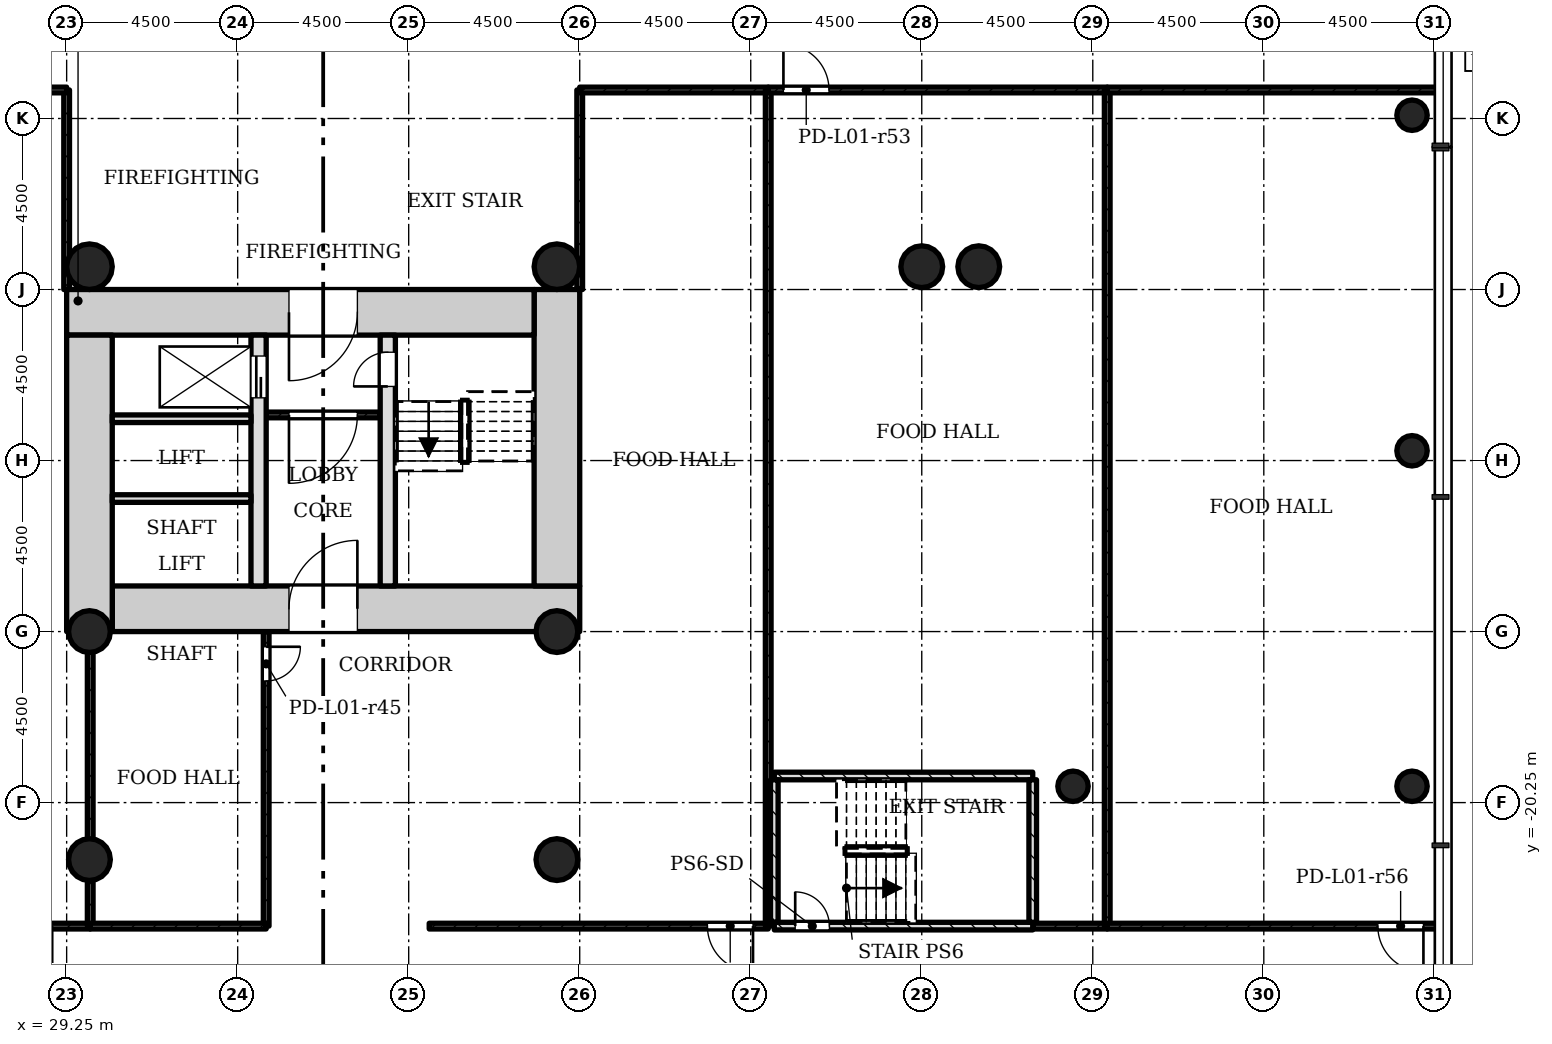
"""IFC4 building model, lengths in metres.
Left out: names, types, materials, properties, quantities, classifications, styles, units other than length and angle.
Written with IfcOpenShell. Run it as: python <this file> out.ifc"""

import sys

from ifc_helpers import new_model, si_unit, direction, frame, frame_2d, origin, origin_2d, place, context, subcontext, project, spatial, rectangle, hollow_circle, extrude, element, fill, save


model = new_model("IFC4")
c1 = context("Model", 3, precision=1e-05, world=origin(), true_north=direction((0.0, 1.0)))
c2 = subcontext(c1, "Body", "Model", "MODEL_VIEW")
j1 = project(units=[si_unit("LENGTHUNIT", "METRE"), si_unit("PLANEANGLEUNIT", "RADIAN")], contexts=[c1])
p1 = place(None, origin())
s1 = spatial("IfcSite", under=j1, at=p1, CompositionType="ELEMENT")
p2 = place(p1, origin())
s2 = spatial("IfcBuilding", under=s1, at=p2, CompositionType="ELEMENT")
p3 = place(p2, frame((0.0, 0.0, 6.0)))
s3 = spatial("IfcBuildingStorey", under=s2, at=p3, CompositionType="ELEMENT", Elevation=6.0)
p4 = place(p3, frame((30.45, -15.15, 0.0), z_axis=(0.0, 0.0, 1.0), x_axis=(1.0, 0.0, 0.0)))
e1 = element("IfcWall", 1, at=p4, inside=s3, PredefinedType="SHEAR", context=c2, shape_type="SweptSolid", body=[
    extrude(rectangle(XDim=12.3, YDim=1.2, at=frame_2d((6.15, 0.0))), origin(), (0.0, 0.0, 1.0), 5.0),
])
p5 = place(p4, frame((4.65, 0.0, 0.0)))
e2 = element("IfcOpeningElement", 2, at=p5, cuts=e1, PredefinedType="OPENING", context=c2, shape_type="SweptSolid", body=[
    extrude(rectangle(XDim=1.8, YDim=2.1, at=frame_2d((0.9, 1.05))), frame((0.0, 0.61, 0.0), z_axis=(0.0, -1.0, 0.0), x_axis=(1.0, 0.0, 0.0)), (0.0, 0.0, 1.0), 1.22),
])
p6 = place(p3, frame((42.15, -14.55, 0.0), z_axis=(0.0, 0.0, 1.0), x_axis=(0.0, 1.0, 0.0)))
e3 = element("IfcWall", 3, at=p6, inside=s3, PredefinedType="SHEAR", context=c2, shape_type="SweptSolid", body=[
    extrude(rectangle(XDim=7.8, YDim=1.2, at=frame_2d((3.9, 0.0))), origin(), (0.0, 0.0, 1.0), 5.0),
])
p7 = place(p3, frame((41.55, -7.35, 0.0), z_axis=(0.0, 0.0, 1.0), x_axis=(-1.0, 0.0, 0.0)))
e4 = element("IfcWall", 4, at=p7, inside=s3, PredefinedType="SHEAR", context=c2, shape_type="SweptSolid", body=[
    extrude(rectangle(XDim=12.3, YDim=1.2, at=frame_2d((6.15, 0.0))), origin(), (0.0, 0.0, 1.0), 5.0),
])
p8 = place(p7, frame((4.65, 0.0, 0.0)))
e5 = element("IfcOpeningElement", 5, at=p8, cuts=e4, PredefinedType="OPENING", context=c2, shape_type="SweptSolid", body=[
    extrude(rectangle(XDim=1.8, YDim=2.1, at=frame_2d((0.9, 1.05))), frame((0.0, 0.61, 0.0), z_axis=(0.0, -1.0, 0.0), x_axis=(1.0, 0.0, 0.0)), (0.0, 0.0, 1.0), 1.22),
])
p9 = place(p3, frame((29.85, -7.95, 0.0), z_axis=(0.0, 0.0, 1.0), x_axis=(0.0, -1.0, 0.0)))
e6 = element("IfcWall", 6, at=p9, inside=s3, PredefinedType="SHEAR", context=c2, shape_type="SweptSolid", body=[
    extrude(rectangle(XDim=7.8, YDim=1.2, at=frame_2d((3.9, 0.0))), origin(), (0.0, 0.0, 1.0), 5.0),
])
p10 = place(p3, frame((34.3, -14.55, 0.0), z_axis=(0.0, 0.0, 1.0), x_axis=(0.0, 1.0, 0.0)))
e7 = element("IfcWall", 7, at=p10, inside=s3, PredefinedType="SHEAR", context=c2, shape_type="SweptSolid", body=[
    extrude(rectangle(XDim=6.6, YDim=0.4, at=frame_2d((3.3, 0.0))), origin(), (0.0, 0.0, 1.0), 5.0),
])
p11 = place(p10, frame((4.95, 0.0, 0.0)))
e8 = element("IfcOpeningElement", 8, at=p11, cuts=e7, PredefinedType="OPENING", context=c2, shape_type="SweptSolid", body=[
    extrude(rectangle(XDim=1.1, YDim=2.1, at=frame_2d((0.55, 1.05))), frame((0.0, 0.21, 0.0), z_axis=(0.0, -1.0, 0.0), x_axis=(1.0, 0.0, 0.0)), (0.0, 0.0, 1.0), 0.42),
])
p12 = place(p3, frame((37.7, -14.55, 0.0), z_axis=(0.0, 0.0, 1.0), x_axis=(0.0, 1.0, 0.0)))
e9 = element("IfcWall", 9, at=p12, inside=s3, PredefinedType="SHEAR", context=c2, shape_type="SweptSolid", body=[
    extrude(rectangle(XDim=6.6, YDim=0.4, at=frame_2d((3.3, 0.0))), origin(), (0.0, 0.0, 1.0), 5.0),
])
p13 = place(p12, frame((5.25, 0.0, 0.0)))
e10 = element("IfcOpeningElement", 10, at=p13, cuts=e9, PredefinedType="OPENING", context=c2, shape_type="SweptSolid", body=[
    extrude(rectangle(XDim=0.9, YDim=2.1, at=frame_2d((0.45, 1.05))), frame((0.0, 0.21, 0.0), z_axis=(0.0, -1.0, 0.0), x_axis=(1.0, 0.0, 0.0)), (0.0, 0.0, 1.0), 0.42),
])
for number, where, z_axis, x_axis in (
    (11, (42.15, -15.75, 0.0), (0.0, 0.0, 1.0), (1.0, 0.0, 0.0)),
    (12, (29.85, -15.75, 0.0), (0.0, 0.0, 1.0), (1.0, 0.0, 0.0)),
    (13, (42.15, -21.75, 0.0), (0.0, 0.0, 1.0), (1.0, 0.0, 0.0)),
    (14, (29.85, -21.75, 0.0), (0.0, 0.0, 1.0), (1.0, 0.0, 0.0)),
    (15, (51.75, -6.15, 0.0), (0.0, 0.0, 1.0), (1.0, 0.0, 0.0)),
    (16, (53.25, -6.15, 0.0), (0.0, 0.0, 1.0), (1.0, 0.0, 0.0)),
):
    element("IfcColumn", number, at=place(p3, frame(where, z_axis=z_axis, x_axis=x_axis)), inside=s3, PredefinedType="COLUMN", context=c2, shape_type="SweptSolid", body=[
        extrude(hollow_circle(Radius=0.55, WallThickness=0.04, at=origin_2d()), origin(), (0.0, 0.0, 1.0), 5.0),
    ])
for number, where, z_axis, x_axis in (
    (17, (42.15, -6.15, 0.0), (0.0, 0.0, 1.0), (1.0, 0.0, 0.0)),
    (18, (29.85, -6.15, 0.0), (0.0, 0.0, 1.0), (1.0, 0.0, 0.0)),
):
    element("IfcColumn", number, at=place(p3, frame(where, z_axis=z_axis, x_axis=x_axis)), inside=s3, PredefinedType="COLUMN", context=c2, shape_type="SweptSolid", body=[
        extrude(hollow_circle(Radius=0.6, WallThickness=0.045, at=origin_2d()), origin(), (0.0, 0.0, 1.0), 5.0),
    ])
for number, where, z_axis, x_axis in (
    (19, (55.73, -19.821, 0.0), (0.0, 0.0, 1.0), (1.0, 0.0, 0.0)),
    (20, (64.65, -19.821, 0.0), (0.0, 0.0, 1.0), (1.0, 0.0, 0.0)),
    (21, (64.65, -10.993, 0.0), (0.0, 0.0, 1.0), (1.0, 0.0, 0.0)),
    (22, (64.65, -2.164, 0.0), (0.0, 0.0, 1.0), (1.0, 0.0, 0.0)),
):
    element("IfcColumn", number, at=place(p3, frame(where, z_axis=z_axis, x_axis=x_axis)), inside=s3, PredefinedType="COLUMN", context=c2, shape_type="SweptSolid", body=[
        extrude(hollow_circle(Radius=0.4, WallThickness=0.028, at=origin_2d()), origin(), (0.0, 0.0, 1.0), 5.0),
    ])
p14 = place(p3, frame((34.5, -10.05, 0.0), z_axis=(0.0, 0.0, 1.0), x_axis=(1.0, 0.0, 0.0)))
e23 = element("IfcWall", 23, at=p14, inside=s3, PredefinedType="PARTITIONING", context=c2, shape_type="SweptSolid", body=[
    extrude(rectangle(XDim=3.0, YDim=0.15, at=frame_2d((1.5, 0.0))), origin(), (0.0, 0.0, 1.0), 4.58),
])
p15 = place(p14, frame((0.6, 0.0, 0.0)))
e24 = element("IfcOpeningElement", 24, at=p15, cuts=e23, PredefinedType="OPENING", context=c2, shape_type="SweptSolid", body=[
    extrude(rectangle(XDim=1.8, YDim=2.1, at=frame_2d((0.9, 1.05))), frame((0.0, 0.085, 0.0), z_axis=(0.0, -1.0, 0.0), x_axis=(1.0, 0.0, 0.0)), (0.0, 0.0, 1.0), 0.17),
])
for number, where, z_axis, x_axis in (
    (25, (30.45, -10.15, 0.0), (0.0, 0.0, 1.0), (1.0, 0.0, 0.0)),
    (26, (30.45, -12.25, 0.0), (0.0, 0.0, 1.0), (1.0, 0.0, 0.0)),
):
    element("IfcWall", number, at=place(p3, frame(where, z_axis=z_axis, x_axis=x_axis)), inside=s3, PredefinedType="SOLIDWALL", context=c2, shape_type="SweptSolid", body=[
        extrude(rectangle(XDim=3.65, YDim=0.2, at=frame_2d((1.825, 0.0))), origin(), (0.0, 0.0, 1.0), 4.58),
    ])
p16 = place(p3, frame((29.25, -1.5, 0.0), z_axis=(0.0, 0.0, 1.0), x_axis=(0.0, -1.0, 0.0)))
e27 = element("IfcWall", 27, at=p16, inside=s3, PredefinedType="PARTITIONING", context=c2, shape_type="SweptSolid", body=[
    extrude(rectangle(XDim=5.25, YDim=0.15, at=frame_2d((2.625, 0.0))), origin(), (0.0, 0.0, 1.0), 4.58),
])
p17 = place(p3, frame((29.87, -23.5, 0.0), z_axis=(0.0, 0.0, 1.0), x_axis=(-1.0, 0.0, 0.0)))
e28 = element("IfcWall", 28, at=p17, inside=s3, PredefinedType="PARTITIONING", context=c2, shape_type="SweptSolid", body=[
    extrude(rectangle(XDim=8.92, YDim=0.15, at=frame_2d((4.46, 0.0))), origin(), (0.0, 0.0, 1.0), 4.58),
])
p18 = place(p17, frame((1.0, 0.0, 0.0)))
e29 = element("IfcOpeningElement", 29, at=p18, cuts=e28, PredefinedType="OPENING", context=c2, shape_type="SweptSolid", body=[
    extrude(rectangle(XDim=1.2, YDim=2.1, at=frame_2d((0.6, 1.05))), frame((0.0, 0.085, 0.0), z_axis=(0.0, -1.0, 0.0), x_axis=(1.0, 0.0, 0.0)), (0.0, 0.0, 1.0), 0.17),
])
p19 = place(p3, frame((20.95, -1.5, 0.0), z_axis=(0.0, 0.0, 1.0), x_axis=(1.0, 0.0, 0.0)))
e30 = element("IfcWall", 30, at=p19, inside=s3, PredefinedType="PARTITIONING", context=c2, shape_type="SweptSolid", body=[
    extrude(rectangle(XDim=8.3, YDim=0.15, at=frame_2d((4.15, 0.0))), origin(), (0.0, 0.0, 1.0), 4.58),
])
p20 = place(p3, frame((29.87, -15.75, 0.0), z_axis=(0.0, 0.0, 1.0), x_axis=(0.0, -1.0, 0.0)))
e31 = element("IfcWall", 31, at=p20, inside=s3, PredefinedType="PARTITIONING", context=c2, shape_type="SweptSolid", body=[
    extrude(rectangle(XDim=7.75, YDim=0.15, at=frame_2d((3.875, 0.0))), origin(), (0.0, 0.0, 1.0), 4.58),
])
p21 = place(p3, frame((34.5, -15.75, 0.0), z_axis=(0.0, 0.0, 1.0), x_axis=(0.0, -1.0, 0.0)))
e32 = element("IfcWall", 32, at=p21, inside=s3, PredefinedType="PARTITIONING", context=c2, shape_type="SweptSolid", body=[
    extrude(rectangle(XDim=7.75, YDim=0.15, at=frame_2d((3.875, 0.0))), origin(), (0.0, 0.0, 1.0), 4.58),
])
p22 = place(p21, frame((0.4, 0.0, 0.0)))
e33 = element("IfcOpeningElement", 33, at=p22, cuts=e32, PredefinedType="OPENING", context=c2, shape_type="SweptSolid", body=[
    extrude(rectangle(XDim=0.9, YDim=2.1, at=frame_2d((0.45, 1.05))), frame((0.0, 0.085, 0.0), z_axis=(0.0, -1.0, 0.0), x_axis=(1.0, 0.0, 0.0)), (0.0, 0.0, 1.0), 0.17),
])
p23 = place(p3, frame((34.5, -23.5, 0.0), z_axis=(0.0, 0.0, 1.0), x_axis=(-1.0, 0.0, 0.0)))
e34 = element("IfcWall", 34, at=p23, inside=s3, PredefinedType="PARTITIONING", context=c2, shape_type="SweptSolid", body=[
    extrude(rectangle(XDim=4.63, YDim=0.15, at=frame_2d((2.315, 0.0))), origin(), (0.0, 0.0, 1.0), 4.58),
])
p24 = place(p3, frame((42.75, -6.75, 0.0), z_axis=(0.0, 0.0, 1.0), x_axis=(0.0, 1.0, 0.0)))
e35 = element("IfcWall", 35, at=p24, inside=s3, PredefinedType="PARTITIONING", context=c2, shape_type="SweptSolid", body=[
    extrude(rectangle(XDim=5.25, YDim=0.15, at=frame_2d((2.625, 0.0))), origin(), (0.0, 0.0, 1.0), 4.58),
])
p25 = place(p3, frame((42.75, -1.5, 0.0), z_axis=(0.0, 0.0, 1.0), x_axis=(1.0, 0.0, 0.0)))
e36 = element("IfcWall", 36, at=p25, inside=s3, PredefinedType="PARTITIONING", context=c2, shape_type="SweptSolid", body=[
    extrude(rectangle(XDim=4.96, YDim=0.15, at=frame_2d((2.48, 0.0))), origin(), (0.0, 0.0, 1.0), 4.58),
])
p26 = place(p3, frame((47.71, -23.5, 0.0), z_axis=(0.0, 0.0, 1.0), x_axis=(-1.0, 0.0, 0.0)))
e37 = element("IfcWall", 37, at=p26, inside=s3, PredefinedType="PARTITIONING", context=c2, shape_type="SweptSolid", body=[
    extrude(rectangle(XDim=8.92, YDim=0.15, at=frame_2d((4.46, 0.0))), origin(), (0.0, 0.0, 1.0), 4.58),
])
p27 = place(p26, frame((0.4, 0.0, 0.0)))
e38 = element("IfcOpeningElement", 38, at=p27, cuts=e37, PredefinedType="OPENING", context=c2, shape_type="SweptSolid", body=[
    extrude(rectangle(XDim=1.2, YDim=2.1, at=frame_2d((0.6, 1.05))), frame((0.0, 0.085, 0.0), z_axis=(0.0, -1.0, 0.0), x_axis=(1.0, 0.0, 0.0)), (0.0, 0.0, 1.0), 0.17),
])
p28 = place(p3, frame((47.71, -1.5, 0.0), z_axis=(0.0, 0.0, 1.0), x_axis=(0.0, -1.0, 0.0)))
e39 = element("IfcWall", 39, at=p28, inside=s3, PredefinedType="PARTITIONING", context=c2, shape_type="SweptSolid", body=[
    extrude(rectangle(XDim=22.0, YDim=0.15, at=frame_2d((11.0, 0.0))), origin(), (0.0, 0.0, 1.0), 4.58),
])
p29 = place(p3, frame((56.63, -23.5, 0.0), z_axis=(0.0, 0.0, 1.0), x_axis=(-1.0, 0.0, 0.0)))
e40 = element("IfcWall", 40, at=p29, inside=s3, PredefinedType="PARTITIONING", context=c2, shape_type="SweptSolid", body=[
    extrude(rectangle(XDim=1.96, YDim=0.15, at=frame_2d((0.98, 0.0))), origin(), (0.0, 0.0, 1.0), 4.58),
])
p30 = place(p3, frame((47.71, -1.5, 0.0), z_axis=(0.0, 0.0, 1.0), x_axis=(1.0, 0.0, 0.0)))
e41 = element("IfcWall", 41, at=p30, inside=s3, PredefinedType="PARTITIONING", context=c2, shape_type="SweptSolid", body=[
    extrude(rectangle(XDim=8.92, YDim=0.15, at=frame_2d((4.46, 0.0))), origin(), (0.0, 0.0, 1.0), 4.58),
])
p31 = place(p30, frame((0.4, 0.0, 0.0)))
e42 = element("IfcOpeningElement", 42, at=p31, cuts=e41, PredefinedType="OPENING", context=c2, shape_type="SweptSolid", body=[
    extrude(rectangle(XDim=1.2, YDim=2.1, at=frame_2d((0.6, 1.05))), frame((0.0, 0.085, 0.0), z_axis=(0.0, -1.0, 0.0), x_axis=(1.0, 0.0, 0.0)), (0.0, 0.0, 1.0), 0.17),
])
p32 = place(p3, frame((56.63, -1.5, 0.0), z_axis=(0.0, 0.0, 1.0), x_axis=(0.0, -1.0, 0.0)))
e43 = element("IfcWall", 43, at=p32, inside=s3, PredefinedType="PARTITIONING", context=c2, shape_type="SweptSolid", body=[
    extrude(rectangle(XDim=22.0, YDim=0.15, at=frame_2d((11.0, 0.0))), origin(), (0.0, 0.0, 1.0), 4.58),
])
p33 = place(p3, frame((65.35, -23.5, 0.0), z_axis=(0.0, 0.0, 1.0), x_axis=(-1.0, 0.0, 0.0)))
e44 = element("IfcWall", 44, at=p33, inside=s3, PredefinedType="PARTITIONING", context=c2, shape_type="SweptSolid", body=[
    extrude(rectangle(XDim=8.72, YDim=0.15, at=frame_2d((4.36, 0.0))), origin(), (0.0, 0.0, 1.0), 4.58),
])
p34 = place(p33, frame((0.4, 0.0, 0.0)))
e45 = element("IfcOpeningElement", 45, at=p34, cuts=e44, PredefinedType="OPENING", context=c2, shape_type="SweptSolid", body=[
    extrude(rectangle(XDim=1.2, YDim=2.1, at=frame_2d((0.6, 1.05))), frame((0.0, 0.085, 0.0), z_axis=(0.0, -1.0, 0.0), x_axis=(1.0, 0.0, 0.0)), (0.0, 0.0, 1.0), 0.17),
])
p35 = place(p3, frame((56.63, -1.5, 0.0), z_axis=(0.0, 0.0, 1.0), x_axis=(1.0, 0.0, 0.0)))
e46 = element("IfcWall", 46, at=p35, inside=s3, PredefinedType="PARTITIONING", context=c2, shape_type="SweptSolid", body=[
    extrude(rectangle(XDim=8.72, YDim=0.15, at=frame_2d((4.36, 0.0))), origin(), (0.0, 0.0, 1.0), 4.58),
])
p36 = place(p3, frame((47.87, -23.5, 0.0), z_axis=(0.0, 0.0, 1.0), x_axis=(1.0, 0.0, 0.0)))
e47 = element("IfcWall", 47, at=p36, inside=s3, PredefinedType="SHEAR", context=c2, shape_type="SweptSolid", body=[
    extrude(rectangle(XDim=6.8, YDim=0.2, at=frame_2d((3.4, 0.0))), origin(), (0.0, 0.0, 1.0), 4.58),
])
p37 = place(p36, frame((0.55, 0.0, 0.0)))
e48 = element("IfcOpeningElement", 48, at=p37, cuts=e47, PredefinedType="OPENING", context=c2, shape_type="SweptSolid", body=[
    extrude(rectangle(XDim=0.9, YDim=2.1, at=frame_2d((0.45, 1.05))), frame((0.0, 0.11, 0.0), z_axis=(0.0, -1.0, 0.0), x_axis=(1.0, 0.0, 0.0)), (0.0, 0.0, 1.0), 0.22),
])
p38 = place(p3, frame((47.87, -19.55, 0.0), z_axis=(0.0, 0.0, 1.0), x_axis=(1.0, 0.0, 0.0)))
e49 = element("IfcWall", 49, at=p38, inside=s3, PredefinedType="SHEAR", context=c2, shape_type="SweptSolid", body=[
    extrude(rectangle(XDim=6.8, YDim=0.2, at=frame_2d((3.4, 0.0))), origin(), (0.0, 0.0, 1.0), 4.58),
])
for number, where, z_axis, x_axis in (
    (50, (47.87, -23.4, 0.0), (0.0, 0.0, 1.0), (0.0, 1.0, 0.0)),
    (51, (54.67, -23.4, 0.0), (0.0, 0.0, 1.0), (0.0, 1.0, 0.0)),
):
    element("IfcWall", number, at=place(p3, frame(where, z_axis=z_axis, x_axis=x_axis)), inside=s3, PredefinedType="SHEAR", context=c2, shape_type="SweptSolid", body=[
        extrude(rectangle(XDim=3.75, YDim=0.2, at=frame_2d((1.875, 0.0))), origin(), (0.0, 0.0, 1.0), 4.58),
    ])
p39 = place(p15, origin())
e52 = element("IfcDoor", 52, at=p39, inside=s3, OperationType="SINGLE_SWING_LEFT", PredefinedType="DOOR", context=c2, shape_type="SweptSolid", body=[
    extrude(rectangle(XDim=1.8, YDim=2.1, at=frame_2d((0.9, 1.05))), frame((0.0, 0.025, 0.0), z_axis=(0.0, -1.0, 0.0), x_axis=(1.0, 0.0, 0.0)), (0.0, 0.0, 1.0), 0.05),
])
fill(e24, e52)
p40 = place(p22, origin())
e53 = element("IfcDoor", 53, at=p40, inside=s3, OperationType="SINGLE_SWING_RIGHT", PredefinedType="DOOR", context=c2, shape_type="SweptSolid", body=[
    extrude(rectangle(XDim=0.9, YDim=2.1, at=frame_2d((0.45, 1.05))), frame((0.0, 0.025, 0.0), z_axis=(0.0, -1.0, 0.0), x_axis=(1.0, 0.0, 0.0)), (0.0, 0.0, 1.0), 0.05),
])
fill(e33, e53)
p41 = place(p27, origin())
e54 = element("IfcDoor", 54, at=p41, inside=s3, OperationType="SINGLE_SWING_RIGHT", PredefinedType="DOOR", context=c2, shape_type="SweptSolid", body=[
    extrude(rectangle(XDim=1.2, YDim=2.1, at=frame_2d((0.6, 1.05))), frame((0.0, 0.025, 0.0), z_axis=(0.0, -1.0, 0.0), x_axis=(1.0, 0.0, 0.0)), (0.0, 0.0, 1.0), 0.05),
])
fill(e38, e54)
p42 = place(p31, origin())
e55 = element("IfcDoor", 55, at=p42, inside=s3, OperationType="SINGLE_SWING_RIGHT", PredefinedType="DOOR", context=c2, shape_type="SweptSolid", body=[
    extrude(rectangle(XDim=1.2, YDim=2.1, at=frame_2d((0.6, 1.05))), frame((0.0, 0.025, 0.0), z_axis=(0.0, -1.0, 0.0), x_axis=(1.0, 0.0, 0.0)), (0.0, 0.0, 1.0), 0.05),
])
fill(e42, e55)
p43 = place(p34, origin())
e56 = element("IfcDoor", 56, at=p43, inside=s3, OperationType="SINGLE_SWING_RIGHT", PredefinedType="DOOR", context=c2, shape_type="SweptSolid", body=[
    extrude(rectangle(XDim=1.2, YDim=2.1, at=frame_2d((0.6, 1.05))), frame((0.0, 0.025, 0.0), z_axis=(0.0, -1.0, 0.0), x_axis=(1.0, 0.0, 0.0)), (0.0, 0.0, 1.0), 0.05),
])
fill(e45, e56)
p44 = place(p37, origin())
e57 = element("IfcDoor", 57, at=p44, inside=s3, OperationType="SINGLE_SWING_RIGHT", PredefinedType="DOOR", context=c2, shape_type="SweptSolid", body=[
    extrude(rectangle(XDim=0.9, YDim=2.1, at=frame_2d((0.45, 1.05))), frame((0.0, 0.025, 0.0), z_axis=(0.0, -1.0, 0.0), x_axis=(1.0, 0.0, 0.0)), (0.0, 0.0, 1.0), 0.05),
])
fill(e48, e57)
p45 = place(p13, origin())
e58 = element("IfcDoor", 58, at=p45, inside=s3, OperationType="SINGLE_SWING_RIGHT", PredefinedType="DOOR", context=c2, shape_type="SweptSolid", body=[
    extrude(rectangle(XDim=0.9, YDim=2.1, at=frame_2d((0.45, 1.05))), frame((0.0, 0.025, 0.0), z_axis=(0.0, -1.0, 0.0), x_axis=(1.0, 0.0, 0.0)), (0.0, 0.0, 1.0), 0.05),
])
fill(e10, e58)
p46 = place(p11, origin())
e59 = element("IfcDoor", 59, at=p46, inside=s3, OperationType="SLIDING_TO_LEFT", PredefinedType="DOOR", context=c2, shape_type="SweptSolid", body=[
    extrude(rectangle(XDim=1.1, YDim=2.1, at=frame_2d((0.55, 1.05))), frame((0.0, 0.025, 0.0), z_axis=(0.0, -1.0, 0.0), x_axis=(1.0, 0.0, 0.0)), (0.0, 0.0, 1.0), 0.05),
])
fill(e8, e59)
p47 = place(p8, origin())
e60 = element("IfcDoor", 60, at=p47, inside=s3, OperationType="SINGLE_SWING_LEFT", PredefinedType="DOOR", context=c2, shape_type="SweptSolid", body=[
    extrude(rectangle(XDim=1.8, YDim=2.1, at=frame_2d((0.9, 1.05))), frame((0.0, 0.025, 0.0), z_axis=(0.0, -1.0, 0.0), x_axis=(1.0, 0.0, 0.0)), (0.0, 0.0, 1.0), 0.05),
])
fill(e5, e60)
p48 = place(p5, origin())
e61 = element("IfcDoor", 61, at=p48, inside=s3, OperationType="SINGLE_SWING_LEFT", PredefinedType="DOOR", context=c2, shape_type="SweptSolid", body=[
    extrude(rectangle(XDim=1.8, YDim=2.1, at=frame_2d((0.9, 1.05))), frame((0.0, 0.025, 0.0), z_axis=(0.0, -1.0, 0.0), x_axis=(1.0, 0.0, 0.0)), (0.0, 0.0, 1.0), 0.05),
])
fill(e2, e61)
save(model, sys.argv[1])
